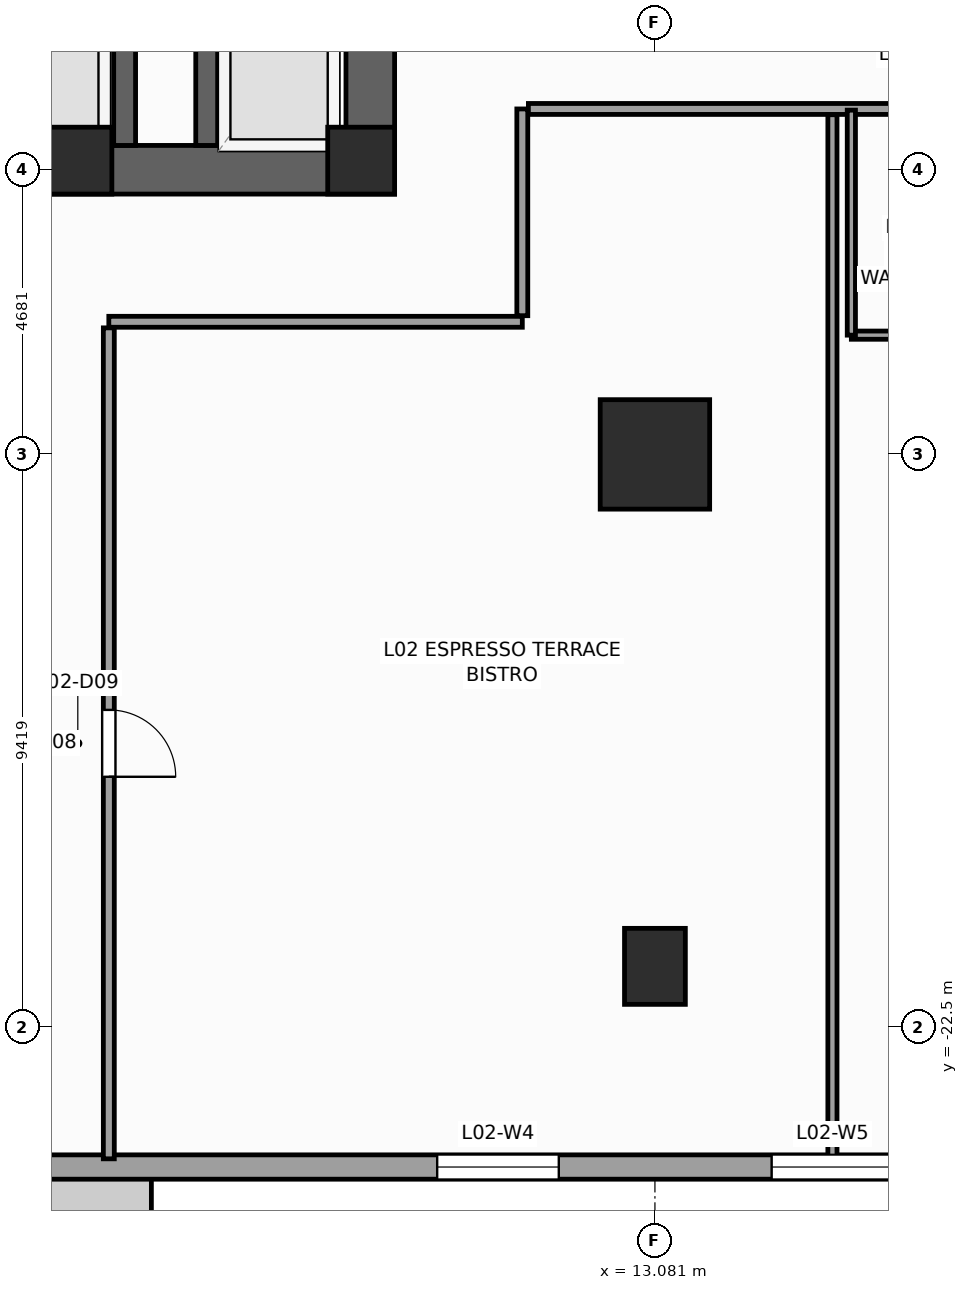
"""IFC4 building model, lengths in metres.
Left out: names, types, materials, properties, quantities, classifications, styles, units other than length and angle.
Written with IfcOpenShell. Run it as: python <this file> out.ifc"""

import sys

from ifc_helpers import new_model, si_unit, direction, frame, frame_2d, origin, origin_2d, place, context, subcontext, project, spatial, rectangle, extrude, source, transform, mapped, element, fill, save


model = new_model("IFC4")
c1 = context("Model", 3, precision=1e-05, world=origin(), true_north=direction((0.0, 1.0)))
c2 = subcontext(c1, "Body", "Model", "MODEL_VIEW")
j1 = project(units=[si_unit("LENGTHUNIT", "METRE"), si_unit("PLANEANGLEUNIT", "RADIAN")], contexts=[c1])
p1 = place(None, origin())
s1 = spatial("IfcSite", under=j1, at=p1, CompositionType="ELEMENT")
p2 = place(p1, origin())
s2 = spatial("IfcBuilding", under=s1, at=p2, CompositionType="ELEMENT")
p3 = place(p2, frame((0.0, 0.0, 11.0)))
s3 = spatial("IfcBuildingStorey", under=s2, at=p3, CompositionType="ELEMENT", Elevation=11.0)
p4 = place(p3, frame((-8.8, -8.4, 0.0), z_axis=(0.0, 0.0, 1.0), x_axis=(1.0, 0.0, 0.0)))
e1 = element("IfcWall", 1, at=p4, inside=s3, PredefinedType="SHEAR", context=c2, shape_type="SweptSolid", body=[
    extrude(rectangle(XDim=17.6, YDim=0.8, at=frame_2d((8.8, 0.0))), origin(), (0.0, 0.0, 1.0), 5.0),
])
p5 = place(p4, frame((8.15, 0.0, 0.0)))
e2 = element("IfcOpeningElement", 2, at=p5, cuts=e1, PredefinedType="OPENING", context=c2, shape_type="SweptSolid", body=[
    extrude(rectangle(XDim=1.3, YDim=2.2, at=frame_2d((0.65, 1.1))), frame((0.0, 0.41, 0.0), z_axis=(0.0, -1.0, 0.0), x_axis=(1.0, 0.0, 0.0)), (0.0, 0.0, 1.0), 0.82),
])
p6 = place(p3, frame((8.4, -8.0, 0.0), z_axis=(0.0, 0.0, 1.0), x_axis=(0.0, 1.0, 0.0)))
e3 = element("IfcWall", 3, at=p6, inside=s3, PredefinedType="SHEAR", context=c2, shape_type="SweptSolid", body=[
    extrude(rectangle(XDim=16.0, YDim=0.8, at=frame_2d((8.0, 0.0))), origin(), (0.0, 0.0, 1.0), 5.0),
])
p7 = place(p6, frame((4.69, 0.0, 0.0)))
e4 = element("IfcOpeningElement", 4, at=p7, cuts=e3, PredefinedType="OPENING", context=c2, shape_type="SweptSolid", body=[
    extrude(rectangle(XDim=1.3, YDim=2.2, at=frame_2d((0.65, 1.1))), frame((0.0, 0.41, 0.0), z_axis=(0.0, -1.0, 0.0), x_axis=(1.0, 0.0, 0.0)), (0.0, 0.0, 1.0), 0.82),
])
p8 = place(p3, frame((4.36, -8.0, 0.0), z_axis=(0.0, 0.0, 1.0), x_axis=(0.0, 1.0, 0.0)))
e5 = element("IfcWall", 5, at=p8, inside=s3, PredefinedType="SHEAR", context=c2, shape_type="SweptSolid", body=[
    extrude(rectangle(XDim=16.0, YDim=0.36, at=frame_2d((8.0, 0.0))), origin(), (0.0, 0.0, 1.0), 5.0),
])
p9 = place(p3, frame((5.71, -8.0, 0.0), z_axis=(0.0, 0.0, 1.0), x_axis=(0.0, 1.0, 0.0)))
e6 = element("IfcWall", 6, at=p9, inside=s3, PredefinedType="SHEAR", context=c2, shape_type="SweptSolid", body=[
    extrude(rectangle(XDim=2.54, YDim=0.36, at=frame_2d((1.27, 0.0))), origin(), (0.0, 0.0, 1.0), 5.0),
])
m1 = source(origin(), c2, "Body", "SweptSolid", [
    extrude(rectangle(XDim=1.1, YDim=1.1, at=origin_2d()), origin(), (0.0, 0.0, 1.0), 5.0),
])
for number, where, z_axis, x_axis in (
    (7, (8.25, -8.25, 0.0), (0.0, 0.0, 1.0), (1.0, 0.0, 0.0)),
    (8, (3.6, -8.25, 0.0), (0.0, 0.0, 1.0), (1.0, 0.0, 0.0)),
):
    element("IfcColumn", number, at=place(p3, frame(where, z_axis=z_axis, x_axis=x_axis)), inside=s3, PredefinedType="PILASTER", context=c2, shape_type="MappedRepresentation", body=[
        mapped(m1, transform((0.0, 0.0, 0.0), scale=1.0)),
    ])
m2 = source(origin(), c2, "Body", "SweptSolid", [
    extrude(rectangle(XDim=1.8, YDim=1.8, at=origin_2d()), origin(), (0.0, 0.0, 1.0), 5.0),
])
p10 = place(p3, frame((13.081, -13.081, 0.0), z_axis=(0.0, 0.0, 1.0), x_axis=(1.0, 0.0, 0.0)))
e9 = element("IfcColumn", 9, at=p10, inside=s3, PredefinedType="COLUMN", context=c2, shape_type="MappedRepresentation", body=[
    mapped(m2, transform((0.0, 0.0, 0.0), scale=1.0)),
])
m3 = source(origin(), c2, "Body", "SweptSolid", [
    extrude(rectangle(XDim=1.0, YDim=1.25, at=origin_2d()), origin(), (0.0, 0.0, 1.0), 5.0),
])
p11 = place(p3, frame((13.081, -21.5, 0.0), z_axis=(0.0, 0.0, 1.0), x_axis=(1.0, 0.0, 0.0)))
e10 = element("IfcColumn", 10, at=p11, inside=s3, PredefinedType="COLUMN", context=c2, shape_type="MappedRepresentation", body=[
    mapped(m3, transform((0.0, 0.0, 0.0), scale=1.0)),
])
p12 = place(p3, frame((-2.0, -24.8, 0.0), z_axis=(0.0, 0.0, 1.0), x_axis=(1.0, 0.0, 0.0)))
e11 = element("IfcWall", 11, at=p12, inside=s3, PredefinedType="STANDARD", context=c2, shape_type="SweptSolid", body=[
    extrude(rectangle(XDim=38.0, YDim=0.4, at=frame_2d((19.0, 0.0))), origin(), (0.0, 0.0, 1.0), 4.66),
])
p13 = place(p12, frame((11.5, 0.0, 0.85)))
e12 = element("IfcOpeningElement", 12, at=p13, cuts=e11, PredefinedType="OPENING", context=c2, shape_type="SweptSolid", body=[
    extrude(rectangle(XDim=2.0, YDim=2.8, at=frame_2d((1.0, 1.4))), frame((0.0, 0.21, 0.0), z_axis=(0.0, -1.0, 0.0), x_axis=(1.0, 0.0, 0.0)), (0.0, 0.0, 1.0), 0.42),
])
p14 = place(p12, frame((17.0, 0.0, 0.85)))
e13 = element("IfcOpeningElement", 13, at=p14, cuts=e11, PredefinedType="OPENING", context=c2, shape_type="SweptSolid", body=[
    extrude(rectangle(XDim=2.0, YDim=2.8, at=frame_2d((1.0, 1.4))), frame((0.0, 0.21, 0.0), z_axis=(0.0, -1.0, 0.0), x_axis=(1.0, 0.0, 0.0)), (0.0, 0.0, 1.0), 0.42),
])
p15 = place(p12, frame((22.0, 0.0, 0.85)))
e14 = element("IfcOpeningElement", 14, at=p15, cuts=e11, PredefinedType="OPENING", context=c2, shape_type="SweptSolid", body=[
    extrude(rectangle(XDim=2.0, YDim=2.8, at=frame_2d((1.0, 1.4))), frame((0.0, 0.21, 0.0), z_axis=(0.0, -1.0, 0.0), x_axis=(1.0, 0.0, 0.0)), (0.0, 0.0, 1.0), 0.42),
])
p16 = place(p3, frame((4.1, -10.9, 0.0), z_axis=(0.0, 0.0, 1.0), x_axis=(1.0, 0.0, 0.0)))
e15 = element("IfcWall", 15, at=p16, inside=s3, PredefinedType="PARTITIONING", context=c2, shape_type="SweptSolid", body=[
    extrude(rectangle(XDim=6.8, YDim=0.18, at=frame_2d((3.4, 0.0))), origin(), (0.0, 0.0, 1.0), 4.66),
])
p17 = place(p3, frame((10.9, -10.8, 0.0), z_axis=(0.0, 0.0, 1.0), x_axis=(0.0, 1.0, 0.0)))
e16 = element("IfcWall", 16, at=p17, inside=s3, PredefinedType="PARTITIONING", context=c2, shape_type="SweptSolid", body=[
    extrude(rectangle(XDim=3.4, YDim=0.18, at=frame_2d((1.7, 0.0))), origin(), (0.0, 0.0, 1.0), 4.66),
])
p18 = place(p3, frame((11.0, -7.4, 0.0), z_axis=(0.0, 0.0, 1.0), x_axis=(1.0, 0.0, 0.0)))
e17 = element("IfcWall", 17, at=p18, inside=s3, PredefinedType="PARTITIONING", context=c2, shape_type="SweptSolid", body=[
    extrude(rectangle(XDim=24.665, YDim=0.18, at=frame_2d((12.333, 0.0))), origin(), (0.0, 0.0, 1.0), 4.66),
])
p19 = place(p18, frame((5.961, 0.0, 0.0)))
e18 = element("IfcOpeningElement", 18, at=p19, cuts=e17, PredefinedType="OPENING", context=c2, shape_type="SweptSolid", body=[
    extrude(rectangle(XDim=0.95, YDim=2.1, at=frame_2d((0.475, 1.05))), frame((0.0, 0.1, 0.0), z_axis=(0.0, -1.0, 0.0), x_axis=(1.0, 0.0, 0.0)), (0.0, 0.0, 1.0), 0.2),
])
p20 = place(p18, frame((15.393, 0.0, 0.0)))
e19 = element("IfcOpeningElement", 19, at=p20, cuts=e17, PredefinedType="OPENING", context=c2, shape_type="SweptSolid", body=[
    extrude(rectangle(XDim=1.1, YDim=2.2, at=frame_2d((0.55, 1.1))), frame((0.0, 0.1, 0.0), z_axis=(0.0, -1.0, 0.0), x_axis=(1.0, 0.0, 0.0)), (0.0, 0.0, 1.0), 0.2),
])
p21 = place(p3, frame((4.1, -24.665, 0.0), z_axis=(0.0, 0.0, 1.0), x_axis=(0.0, 1.0, 0.0)))
e20 = element("IfcWall", 20, at=p21, inside=s3, PredefinedType="PARTITIONING", context=c2, shape_type="SweptSolid", body=[
    extrude(rectangle(XDim=13.665, YDim=0.18, at=frame_2d((6.833, 0.0))), origin(), (0.0, 0.0, 1.0), 4.66),
])
p22 = place(p21, frame((6.282, 0.0, 0.0)))
e21 = element("IfcOpeningElement", 21, at=p22, cuts=e20, PredefinedType="OPENING", context=c2, shape_type="SweptSolid", body=[
    extrude(rectangle(XDim=1.1, YDim=2.2, at=frame_2d((0.55, 1.1))), frame((0.0, 0.1, 0.0), z_axis=(0.0, -1.0, 0.0), x_axis=(1.0, 0.0, 0.0)), (0.0, 0.0, 1.0), 0.2),
])
p23 = place(p3, frame((16.0, -24.665, 0.0), z_axis=(0.0, 0.0, 1.0), x_axis=(0.0, 1.0, 0.0)))
e22 = element("IfcWall", 22, at=p23, inside=s3, PredefinedType="PARTITIONING", context=c2, shape_type="SweptSolid", body=[
    extrude(rectangle(XDim=17.17, YDim=0.15, at=frame_2d((8.585, 0.0))), origin(), (0.0, 0.0, 1.0), 4.66),
])
p24 = place(p3, frame((16.311, -11.12, 0.0), z_axis=(0.0, 0.0, 1.0), x_axis=(1.0, 0.0, 0.0)))
e23 = element("IfcWall", 23, at=p24, inside=s3, PredefinedType="PARTITIONING", context=c2, shape_type="SweptSolid", body=[
    extrude(rectangle(XDim=2.25, YDim=0.135, at=frame_2d((1.125, 0.0))), origin(), (0.0, 0.0, 1.0), 4.66),
])
p25 = place(p3, frame((16.311, -11.12, 0.0), z_axis=(0.0, 0.0, 1.0), x_axis=(0.0, 1.0, 0.0)))
e24 = element("IfcWall", 24, at=p25, inside=s3, PredefinedType="PARTITIONING", context=c2, shape_type="SweptSolid", body=[
    extrude(rectangle(XDim=3.7, YDim=0.135, at=frame_2d((1.85, 0.0))), origin(), (0.0, 0.0, 1.0), 4.66),
])
m4 = source(origin(), c2, "Body", "SweptSolid", [
    extrude(rectangle(XDim=2.0, YDim=2.8, at=frame_2d((1.0, 1.4))), frame((0.0, 0.03, 0.0), z_axis=(0.0, -1.0, 0.0), x_axis=(1.0, 0.0, 0.0)), (0.0, 0.0, 1.0), 0.06),
])
p26 = place(p13, origin())
e25 = element("IfcWindow", 25, at=p26, inside=s3, PartitioningType="SINGLE_PANEL", PredefinedType="WINDOW", context=c2, shape_type="MappedRepresentation", body=[
    mapped(m4, transform((0.0, 0.0, 0.0), scale=1.0)),
])
fill(e12, e25)
p27 = place(p14, origin())
e26 = element("IfcWindow", 26, at=p27, inside=s3, PartitioningType="SINGLE_PANEL", PredefinedType="WINDOW", context=c2, shape_type="MappedRepresentation", body=[
    mapped(m4, transform((0.0, 0.0, 0.0), scale=1.0)),
])
fill(e13, e26)
m5 = source(origin(), c2, "Body", "SweptSolid", [
    extrude(rectangle(XDim=1.1, YDim=2.2, at=frame_2d((0.55, 1.1))), frame((0.0, 0.025, 0.0), z_axis=(0.0, -1.0, 0.0), x_axis=(1.0, 0.0, 0.0)), (0.0, 0.0, 1.0), 0.05),
])
p28 = place(p22, frame((1.1, 0.0, 0.0), z_axis=(0.0, 0.0, 1.0), x_axis=(-1.0, 0.0, 0.0)))
e27 = element("IfcDoor", 27, at=p28, inside=s3, OperationType="SINGLE_SWING_LEFT", PredefinedType="DOOR", context=c2, shape_type="MappedRepresentation", body=[
    mapped(m5, transform((0.0, 0.0, 0.0), scale=1.0)),
])
fill(e21, e27)
save(model, sys.argv[1])
